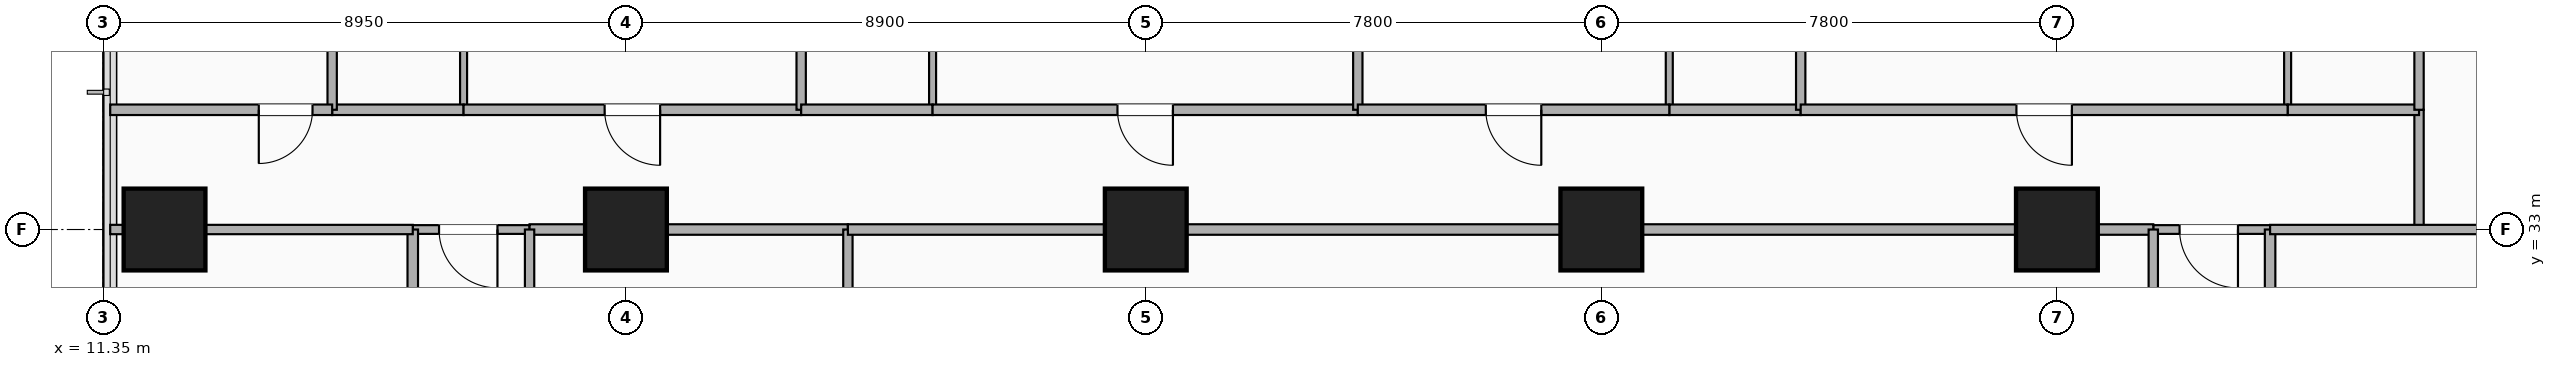
"""IFC4 building model, lengths in metres.
Left out: names, types, materials, properties, quantities, classifications, styles, units other than length and angle.
Written with IfcOpenShell. Run it as: python <this file> out.ifc"""

import sys

from ifc_helpers import new_model, si_unit, direction, frame, frame_2d, origin, origin_2d, place, context, subcontext, project, spatial, rectangle, extrude, element, fill, save


model = new_model("IFC4")
c1 = context("Model", 3, precision=1e-05, world=origin(), true_north=direction((0.0, 1.0)))
c2 = subcontext(c1, "Body", "Model", "MODEL_VIEW")
j1 = project(units=[si_unit("LENGTHUNIT", "METRE"), si_unit("PLANEANGLEUNIT", "RADIAN")], contexts=[c1])
p1 = place(None, origin())
s1 = spatial("IfcSite", under=j1, at=p1, CompositionType="ELEMENT")
p2 = place(p1, origin())
s2 = spatial("IfcBuilding", under=s1, at=p2, CompositionType="ELEMENT")
p3 = place(p2, frame((0.0, 0.0, 68.4)))
s3 = spatial("IfcBuildingStorey", under=s2, at=p3, CompositionType="ELEMENT", Elevation=68.4)
for number, where, z_axis, x_axis in (
    (1, (20.3, 33.0, -0.28), (0.0, 0.0, 1.0), (1.0, 0.0, 0.0)),
    (2, (29.2, 33.0, -0.28), (0.0, 0.0, 1.0), (1.0, 0.0, 0.0)),
    (3, (37.0, 33.0, -0.28), (0.0, 0.0, 1.0), (1.0, 0.0, 0.0)),
    (4, (44.8, 33.0, -0.28), (0.0, 0.0, 1.0), (1.0, 0.0, 0.0)),
    (5, (12.4, 33.0, -0.28), (0.0, 0.0, 1.0), (1.0, 0.0, 0.0)),
):
    element("IfcColumn", number, at=place(p3, frame(where, z_axis=z_axis, x_axis=x_axis)), inside=s3, PredefinedType="COLUMN", context=c2, shape_type="SweptSolid", body=[
        extrude(rectangle(XDim=1.4, YDim=1.4, at=origin_2d()), origin(), (0.0, 0.0, 1.0), 3.5),
    ])
p4 = place(p3, frame((16.65, 33.0, 0.0), z_axis=(0.0, 0.0, 1.0), x_axis=(1.0, 0.0, 0.0)))
e6 = element("IfcWall", 6, at=p4, inside=s3, PredefinedType="PARTITIONING", context=c2, shape_type="SweptSolid", body=[
    extrude(rectangle(XDim=2.0, YDim=0.15, at=frame_2d((1.0, 0.0))), origin(), (0.0, 0.0, 1.0), 2.51),
])
p5 = place(p4, frame((0.45, 0.0, 0.0)))
e7 = element("IfcOpeningElement", 7, at=p5, cuts=e6, PredefinedType="OPENING", context=c2, shape_type="SweptSolid", body=[
    extrude(rectangle(XDim=1.0, YDim=2.15, at=frame_2d((0.5, 1.075))), frame((0.0, 0.085, 0.0), z_axis=(0.0, -1.0, 0.0), x_axis=(1.0, 0.0, 0.0)), (0.0, 0.0, 1.0), 0.17),
])
p6 = place(p3, frame((46.45, 33.0, 0.0), z_axis=(0.0, 0.0, 1.0), x_axis=(1.0, 0.0, 0.0)))
e8 = element("IfcWall", 8, at=p6, inside=s3, PredefinedType="PARTITIONING", context=c2, shape_type="SweptSolid", body=[
    extrude(rectangle(XDim=2.0, YDim=0.15, at=frame_2d((1.0, 0.0))), origin(), (0.0, 0.0, 1.0), 2.51),
])
p7 = place(p6, frame((0.45, 0.0, 0.0)))
e9 = element("IfcOpeningElement", 9, at=p7, cuts=e8, PredefinedType="OPENING", context=c2, shape_type="SweptSolid", body=[
    extrude(rectangle(XDim=1.0, YDim=2.15, at=frame_2d((0.5, 1.075))), frame((0.0, 0.085, 0.0), z_axis=(0.0, -1.0, 0.0), x_axis=(1.0, 0.0, 0.0)), (0.0, 0.0, 1.0), 0.17),
])
p8 = place(p3, frame((51.0, 33.0, 0.0), z_axis=(0.0, 0.0, 1.0), x_axis=(0.0, 1.0, 0.0)))
e10 = element("IfcWall", 10, at=p8, inside=s3, PredefinedType="PARTITIONING", context=c2, shape_type="SweptSolid", body=[
    extrude(rectangle(XDim=2.05, YDim=0.16, at=frame_2d((1.025, 0.0))), origin(), (0.0, 0.0, 1.0), 2.51),
])
p9 = place(p3, frame((18.65, 33.0, 0.0), z_axis=(0.0, 0.0, 1.0), x_axis=(1.0, 0.0, 0.0)))
e11 = element("IfcWall", 11, at=p9, inside=s3, PredefinedType="PARTITIONING", context=c2, shape_type="SweptSolid", body=[
    extrude(rectangle(XDim=5.45, YDim=0.18, at=frame_2d((2.725, 0.0))), origin(), (0.0, 0.0, 1.0), 2.51),
])
for number, where, z_axis, x_axis in (
    (12, (18.65, 22.65, 0.0), (0.0, 0.0, 1.0), (0.0, 1.0, 0.0)),
    (13, (24.1, 22.65, 0.0), (0.0, 0.0, 1.0), (0.0, 1.0, 0.0)),
):
    element("IfcWall", number, at=place(p3, frame(where, z_axis=z_axis, x_axis=x_axis)), inside=s3, PredefinedType="PARTITIONING", context=c2, shape_type="SweptSolid", body=[
        extrude(rectangle(XDim=10.35, YDim=0.16, at=frame_2d((5.175, 0.0))), origin(), (0.0, 0.0, 1.0), 2.51),
    ])
p10 = place(p3, frame((24.1, 33.0, 0.0), z_axis=(0.0, 0.0, 1.0), x_axis=(1.0, 0.0, 0.0)))
e14 = element("IfcWall", 14, at=p10, inside=s3, PredefinedType="PARTITIONING", context=c2, shape_type="SweptSolid", body=[
    extrude(rectangle(XDim=22.35, YDim=0.18, at=frame_2d((11.175, 0.0))), origin(), (0.0, 0.0, 1.0), 2.51),
])
p11 = place(p3, frame((46.45, 22.65, 0.0), z_axis=(0.0, 0.0, 1.0), x_axis=(0.0, 1.0, 0.0)))
e15 = element("IfcWall", 15, at=p11, inside=s3, PredefinedType="PARTITIONING", context=c2, shape_type="SweptSolid", body=[
    extrude(rectangle(XDim=10.35, YDim=0.16, at=frame_2d((5.175, 0.0))), origin(), (0.0, 0.0, 1.0), 2.51),
])
p12 = place(p3, frame((17.52, 35.05, 0.0), z_axis=(0.0, 0.0, 1.0), x_axis=(0.0, 1.0, 0.0)))
e16 = element("IfcWall", 16, at=p12, inside=s3, PredefinedType="PARTITIONING", context=c2, shape_type="SweptSolid", body=[
    extrude(rectangle(XDim=2.35, YDim=0.12, at=frame_2d((1.175, 0.0))), origin(), (0.0, 0.0, 1.0), 3.22),
])
p13 = place(p3, frame((15.27, 35.05, 0.0), z_axis=(0.0, 0.0, 1.0), x_axis=(1.0, 0.0, 0.0)))
e17 = element("IfcWall", 17, at=p13, inside=s3, PredefinedType="PARTITIONING", context=c2, shape_type="SweptSolid", body=[
    extrude(rectangle(XDim=2.25, YDim=0.18, at=frame_2d((1.125, 0.0))), origin(), (0.0, 0.0, 1.0), 3.22),
])
p14 = place(p3, frame((17.52, 35.05, 0.0), z_axis=(0.0, 0.0, 1.0), x_axis=(1.0, 0.0, 0.0)))
e18 = element("IfcWall", 18, at=p14, inside=s3, PredefinedType="PARTITIONING", context=c2, shape_type="SweptSolid", body=[
    extrude(rectangle(XDim=5.78, YDim=0.18, at=frame_2d((2.89, 0.0))), origin(), (0.0, 0.0, 1.0), 2.51),
])
p15 = place(p14, frame((2.415, 0.0, 0.0)))
e19 = element("IfcOpeningElement", 19, at=p15, cuts=e18, PredefinedType="OPENING", context=c2, shape_type="SweptSolid", body=[
    extrude(rectangle(XDim=0.95, YDim=2.15, at=frame_2d((0.475, 1.075))), frame((0.0, 0.1, 0.0), z_axis=(0.0, -1.0, 0.0), x_axis=(1.0, 0.0, 0.0)), (0.0, 0.0, 1.0), 0.2),
])
p16 = place(p3, frame((15.27, 35.05, 0.0), z_axis=(0.0, 0.0, 1.0), x_axis=(0.0, 1.0, 0.0)))
e20 = element("IfcWall", 20, at=p16, inside=s3, PredefinedType="PARTITIONING", context=c2, shape_type="SweptSolid", body=[
    extrude(rectangle(XDim=9.53, YDim=0.16, at=frame_2d((4.765, 0.0))), origin(), (0.0, 0.0, 1.0), 3.22),
])
p17 = place(p3, frame((23.3, 35.05, 0.0), z_axis=(0.0, 0.0, 1.0), x_axis=(0.0, 1.0, 0.0)))
e21 = element("IfcWall", 21, at=p17, inside=s3, PredefinedType="PARTITIONING", context=c2, shape_type="SweptSolid", body=[
    extrude(rectangle(XDim=13.33, YDim=0.16, at=frame_2d((6.665, 0.0))), origin(), (0.0, 0.0, 1.0), 2.583),
])
p18 = place(p3, frame((25.55, 35.05, 0.0), z_axis=(0.0, 0.0, 1.0), x_axis=(0.0, 1.0, 0.0)))
e22 = element("IfcWall", 22, at=p18, inside=s3, PredefinedType="PARTITIONING", context=c2, shape_type="SweptSolid", body=[
    extrude(rectangle(XDim=2.35, YDim=0.12, at=frame_2d((1.175, 0.0))), origin(), (0.0, 0.0, 1.0), 2.902),
])
p19 = place(p3, frame((23.3, 35.05, 0.0), z_axis=(0.0, 0.0, 1.0), x_axis=(1.0, 0.0, 0.0)))
e23 = element("IfcWall", 23, at=p19, inside=s3, PredefinedType="PARTITIONING", context=c2, shape_type="SweptSolid", body=[
    extrude(rectangle(XDim=2.25, YDim=0.18, at=frame_2d((1.125, 0.0))), origin(), (0.0, 0.0, 1.0), 3.22),
])
p20 = place(p3, frame((25.55, 35.05, 0.0), z_axis=(0.0, 0.0, 1.0), x_axis=(1.0, 0.0, 0.0)))
e24 = element("IfcWall", 24, at=p20, inside=s3, PredefinedType="PARTITIONING", context=c2, shape_type="SweptSolid", body=[
    extrude(rectangle(XDim=7.28, YDim=0.18, at=frame_2d((3.64, 0.0))), origin(), (0.0, 0.0, 1.0), 2.51),
])
p21 = place(p20, frame((3.165, 0.0, 0.0)))
e25 = element("IfcOpeningElement", 25, at=p21, cuts=e24, PredefinedType="OPENING", context=c2, shape_type="SweptSolid", body=[
    extrude(rectangle(XDim=0.95, YDim=2.15, at=frame_2d((0.475, 1.075))), frame((0.0, 0.1, 0.0), z_axis=(0.0, -1.0, 0.0), x_axis=(1.0, 0.0, 0.0)), (0.0, 0.0, 1.0), 0.2),
])
p22 = place(p3, frame((32.83, 35.05, 0.0), z_axis=(0.0, 0.0, 1.0), x_axis=(0.0, 1.0, 0.0)))
e26 = element("IfcWall", 26, at=p22, inside=s3, PredefinedType="PARTITIONING", context=c2, shape_type="SweptSolid", body=[
    extrude(rectangle(XDim=13.33, YDim=0.16, at=frame_2d((6.665, 0.0))), origin(), (0.0, 0.0, 1.0), 2.583),
])
p23 = place(p3, frame((38.163, 35.05, 0.0), z_axis=(0.0, 0.0, 1.0), x_axis=(0.0, 1.0, 0.0)))
e27 = element("IfcWall", 27, at=p23, inside=s3, PredefinedType="PARTITIONING", context=c2, shape_type="SweptSolid", body=[
    extrude(rectangle(XDim=2.35, YDim=0.12, at=frame_2d((1.175, 0.0))), origin(), (0.0, 0.0, 1.0), 2.902),
])
p24 = place(p3, frame((38.163, 35.05, 0.0), z_axis=(0.0, 0.0, 1.0), x_axis=(1.0, 0.0, 0.0)))
e28 = element("IfcWall", 28, at=p24, inside=s3, PredefinedType="PARTITIONING", context=c2, shape_type="SweptSolid", body=[
    extrude(rectangle(XDim=2.25, YDim=0.18, at=frame_2d((1.125, 0.0))), origin(), (0.0, 0.0, 1.0), 3.22),
])
p25 = place(p3, frame((32.83, 35.05, 0.0), z_axis=(0.0, 0.0, 1.0), x_axis=(1.0, 0.0, 0.0)))
e29 = element("IfcWall", 29, at=p25, inside=s3, PredefinedType="PARTITIONING", context=c2, shape_type="SweptSolid", body=[
    extrude(rectangle(XDim=5.333, YDim=0.18, at=frame_2d((2.667, 0.0))), origin(), (0.0, 0.0, 1.0), 2.51),
])
p26 = place(p25, frame((2.191, 0.0, 0.0)))
e30 = element("IfcOpeningElement", 30, at=p26, cuts=e29, PredefinedType="OPENING", context=c2, shape_type="SweptSolid", body=[
    extrude(rectangle(XDim=0.95, YDim=2.15, at=frame_2d((0.475, 1.075))), frame((0.0, 0.1, 0.0), z_axis=(0.0, -1.0, 0.0), x_axis=(1.0, 0.0, 0.0)), (0.0, 0.0, 1.0), 0.2),
])
p27 = place(p3, frame((40.413, 35.05, 0.0), z_axis=(0.0, 0.0, 1.0), x_axis=(0.0, 1.0, 0.0)))
e31 = element("IfcWall", 31, at=p27, inside=s3, PredefinedType="PARTITIONING", context=c2, shape_type="SweptSolid", body=[
    extrude(rectangle(XDim=13.33, YDim=0.16, at=frame_2d((6.665, 0.0))), origin(), (0.0, 0.0, 1.0), 2.583),
])
p28 = place(p3, frame((48.75, 35.05, 0.0), z_axis=(0.0, 0.0, 1.0), x_axis=(0.0, 1.0, 0.0)))
e32 = element("IfcWall", 32, at=p28, inside=s3, PredefinedType="PARTITIONING", context=c2, shape_type="SweptSolid", body=[
    extrude(rectangle(XDim=2.35, YDim=0.12, at=frame_2d((1.175, 0.0))), origin(), (0.0, 0.0, 1.0), 3.22),
])
p29 = place(p3, frame((48.75, 35.05, 0.0), z_axis=(0.0, 0.0, 1.0), x_axis=(1.0, 0.0, 0.0)))
e33 = element("IfcWall", 33, at=p29, inside=s3, PredefinedType="PARTITIONING", context=c2, shape_type="SweptSolid", body=[
    extrude(rectangle(XDim=2.25, YDim=0.18, at=frame_2d((1.125, 0.0))), origin(), (0.0, 0.0, 1.0), 3.22),
])
p30 = place(p3, frame((40.413, 35.05, 0.0), z_axis=(0.0, 0.0, 1.0), x_axis=(1.0, 0.0, 0.0)))
e34 = element("IfcWall", 34, at=p30, inside=s3, PredefinedType="PARTITIONING", context=c2, shape_type="SweptSolid", body=[
    extrude(rectangle(XDim=8.337, YDim=0.18, at=frame_2d((4.168, 0.0))), origin(), (0.0, 0.0, 1.0), 2.51),
])
p31 = place(p30, frame((3.693, 0.0, 0.0)))
e35 = element("IfcOpeningElement", 35, at=p31, cuts=e34, PredefinedType="OPENING", context=c2, shape_type="SweptSolid", body=[
    extrude(rectangle(XDim=0.95, YDim=2.15, at=frame_2d((0.475, 1.075))), frame((0.0, 0.1, 0.0), z_axis=(0.0, -1.0, 0.0), x_axis=(1.0, 0.0, 0.0)), (0.0, 0.0, 1.0), 0.2),
])
p32 = place(p3, frame((51.0, 35.05, 0.0), z_axis=(0.0, 0.0, 1.0), x_axis=(0.0, 1.0, 0.0)))
e36 = element("IfcWall", 36, at=p32, inside=s3, PredefinedType="PARTITIONING", context=c2, shape_type="SweptSolid", body=[
    extrude(rectangle(XDim=13.33, YDim=0.16, at=frame_2d((6.665, 0.0))), origin(), (0.0, 0.0, 1.0), 3.22),
])
p33 = place(p3, frame((16.65, 28.183, 0.0), z_axis=(0.0, 0.0, 1.0), x_axis=(0.0, 1.0, 0.0)))
e37 = element("IfcWall", 37, at=p33, inside=s3, PredefinedType="PARTITIONING", context=c2, shape_type="SweptSolid", body=[
    extrude(rectangle(XDim=4.817, YDim=0.18, at=frame_2d((2.408, 0.0))), origin(), (0.0, 0.0, 1.0), 2.51),
])
p34 = place(p33, frame((1.933, 0.0, 0.0)))
e38 = element("IfcOpeningElement", 38, at=p34, cuts=e37, PredefinedType="OPENING", context=c2, shape_type="SweptSolid", body=[
    extrude(rectangle(XDim=0.95, YDim=2.15, at=frame_2d((0.475, 1.075))), frame((0.0, 0.1, 0.0), z_axis=(0.0, -1.0, 0.0), x_axis=(1.0, 0.0, 0.0)), (0.0, 0.0, 1.0), 0.2),
])
p35 = place(p3, frame((11.47, 33.0, 0.0), z_axis=(0.0, 0.0, 1.0), x_axis=(1.0, 0.0, 0.0)))
e39 = element("IfcWall", 39, at=p35, inside=s3, PredefinedType="PARTITIONING", context=c2, shape_type="SweptSolid", body=[
    extrude(rectangle(XDim=5.18, YDim=0.16, at=frame_2d((2.59, 0.0))), origin(), (0.0, 0.0, 1.0), 2.51),
])
p36 = place(p3, frame((48.45, 28.55, 0.0), z_axis=(0.0, 0.0, 1.0), x_axis=(0.0, 1.0, 0.0)))
e40 = element("IfcWall", 40, at=p36, inside=s3, PredefinedType="PARTITIONING", context=c2, shape_type="SweptSolid", body=[
    extrude(rectangle(XDim=4.45, YDim=0.18, at=frame_2d((2.225, 0.0))), origin(), (0.0, 0.0, 1.0), 2.51),
])
p37 = place(p36, frame((2.7, 0.0, 0.0), z_axis=(0.0, 0.0, 1.0), x_axis=(-1.0, 0.0, 0.0)))
e41 = element("IfcOpeningElement", 41, at=p37, cuts=e40, PredefinedType="OPENING", context=c2, shape_type="SweptSolid", body=[
    extrude(rectangle(XDim=0.95, YDim=2.15, at=frame_2d((0.475, 1.075))), frame((0.0, 0.1, 0.0), z_axis=(0.0, -1.0, 0.0), x_axis=(1.0, 0.0, 0.0)), (0.0, 0.0, 1.0), 0.2),
])
p38 = place(p3, frame((48.45, 33.0, 0.0), z_axis=(0.0, 0.0, 1.0), x_axis=(1.0, 0.0, 0.0)))
e42 = element("IfcWall", 42, at=p38, inside=s3, PredefinedType="PARTITIONING", context=c2, shape_type="SweptSolid", body=[
    extrude(rectangle(XDim=13.23, YDim=0.16, at=frame_2d((6.615, 0.0))), origin(), (0.0, 0.0, 1.0), 2.51),
])
p39 = place(p3, frame((11.47, 35.05, 0.0), z_axis=(0.0, 0.0, 1.0), x_axis=(1.0, 0.0, 0.0)))
e43 = element("IfcWall", 43, at=p39, inside=s3, PredefinedType="PARTITIONING", context=c2, shape_type="SweptSolid", body=[
    extrude(rectangle(XDim=3.8, YDim=0.18, at=frame_2d((1.9, 0.0))), origin(), (0.0, 0.0, 1.0), 3.22),
])
p40 = place(p39, frame((2.544, 0.0, 0.0)))
e44 = element("IfcOpeningElement", 44, at=p40, cuts=e43, PredefinedType="OPENING", context=c2, shape_type="SweptSolid", body=[
    extrude(rectangle(XDim=0.92, YDim=2.08, at=frame_2d((0.46, 1.04))), frame((0.0, 0.1, 0.0), z_axis=(0.0, -1.0, 0.0), x_axis=(1.0, 0.0, 0.0)), (0.0, 0.0, 1.0), 0.2),
])
p41 = place(p5, origin())
e45 = element("IfcDoor", 45, at=p41, inside=s3, OperationType="SINGLE_SWING_RIGHT", PredefinedType="DOOR", context=c2, shape_type="SweptSolid", body=[
    extrude(rectangle(XDim=1.0, YDim=2.15, at=frame_2d((0.5, 1.075))), frame((0.0, 0.025, 0.0), z_axis=(0.0, -1.0, 0.0), x_axis=(1.0, 0.0, 0.0)), (0.0, 0.0, 1.0), 0.05),
])
fill(e7, e45)
p42 = place(p7, origin())
e46 = element("IfcDoor", 46, at=p42, inside=s3, OperationType="SINGLE_SWING_RIGHT", PredefinedType="DOOR", context=c2, shape_type="SweptSolid", body=[
    extrude(rectangle(XDim=1.0, YDim=2.15, at=frame_2d((0.5, 1.075))), frame((0.0, 0.025, 0.0), z_axis=(0.0, -1.0, 0.0), x_axis=(1.0, 0.0, 0.0)), (0.0, 0.0, 1.0), 0.05),
])
fill(e9, e46)
p43 = place(p15, origin())
e47 = element("IfcDoor", 47, at=p43, inside=s3, OperationType="SINGLE_SWING_RIGHT", PredefinedType="DOOR", context=c2, shape_type="SweptSolid", body=[
    extrude(rectangle(XDim=0.95, YDim=2.15, at=frame_2d((0.475, 1.075))), frame((0.0, 0.025, 0.0), z_axis=(0.0, -1.0, 0.0), x_axis=(1.0, 0.0, 0.0)), (0.0, 0.0, 1.0), 0.05),
])
fill(e19, e47)
p44 = place(p21, origin())
e48 = element("IfcDoor", 48, at=p44, inside=s3, OperationType="SINGLE_SWING_RIGHT", PredefinedType="DOOR", context=c2, shape_type="SweptSolid", body=[
    extrude(rectangle(XDim=0.95, YDim=2.15, at=frame_2d((0.475, 1.075))), frame((0.0, 0.025, 0.0), z_axis=(0.0, -1.0, 0.0), x_axis=(1.0, 0.0, 0.0)), (0.0, 0.0, 1.0), 0.05),
])
fill(e25, e48)
p45 = place(p26, origin())
e49 = element("IfcDoor", 49, at=p45, inside=s3, OperationType="SINGLE_SWING_RIGHT", PredefinedType="DOOR", context=c2, shape_type="SweptSolid", body=[
    extrude(rectangle(XDim=0.95, YDim=2.15, at=frame_2d((0.475, 1.075))), frame((0.0, 0.025, 0.0), z_axis=(0.0, -1.0, 0.0), x_axis=(1.0, 0.0, 0.0)), (0.0, 0.0, 1.0), 0.05),
])
fill(e30, e49)
p46 = place(p31, origin())
e50 = element("IfcDoor", 50, at=p46, inside=s3, OperationType="SINGLE_SWING_RIGHT", PredefinedType="DOOR", context=c2, shape_type="SweptSolid", body=[
    extrude(rectangle(XDim=0.95, YDim=2.15, at=frame_2d((0.475, 1.075))), frame((0.0, 0.025, 0.0), z_axis=(0.0, -1.0, 0.0), x_axis=(1.0, 0.0, 0.0)), (0.0, 0.0, 1.0), 0.05),
])
fill(e35, e50)
p47 = place(p40, origin())
e51 = element("IfcDoor", 51, at=p47, inside=s3, OperationType="SINGLE_SWING_LEFT", PredefinedType="DOOR", context=c2, shape_type="SweptSolid", body=[
    extrude(rectangle(XDim=0.92, YDim=2.08, at=frame_2d((0.46, 1.04))), frame((0.0, 0.025, 0.0), z_axis=(0.0, -1.0, 0.0), x_axis=(1.0, 0.0, 0.0)), (0.0, 0.0, 1.0), 0.05),
])
fill(e44, e51)
save(model, sys.argv[1])
